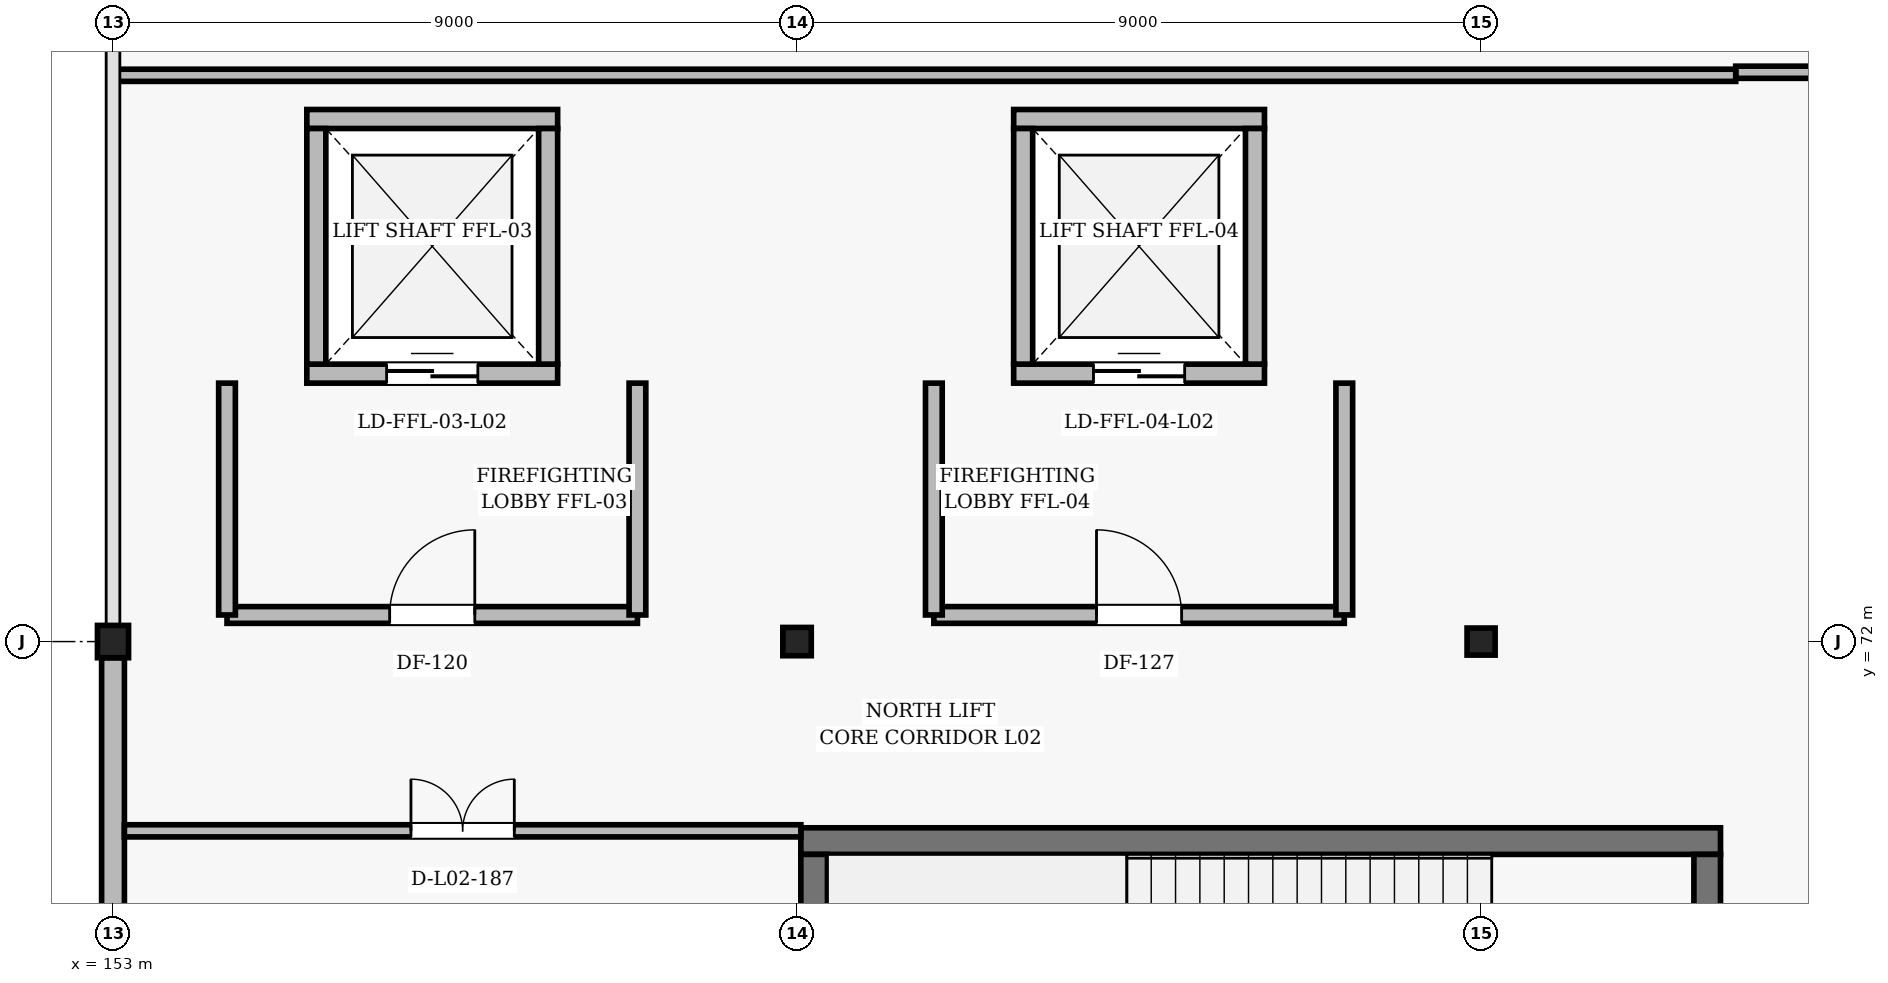
"""IFC4 building model, lengths in metres.
Left out: names, types, materials, properties, quantities, classifications, styles, units other than length and angle.
Written with IfcOpenShell. Run it as: python <this file> out.ifc"""

import sys

from ifc_helpers import new_model, si_unit, direction, frame, frame_2d, origin, origin_2d, place, context, subcontext, project, spatial, rectangle, i_section, extrude, element, fill, save


model = new_model("IFC4")
c1 = context("Model", 3, precision=1e-05, world=origin(), true_north=direction((0.0, 1.0)))
c2 = subcontext(c1, "Body", "Model", "MODEL_VIEW")
j1 = project(units=[si_unit("LENGTHUNIT", "METRE"), si_unit("PLANEANGLEUNIT", "RADIAN")], contexts=[c1])
p1 = place(None, origin())
s1 = spatial("IfcSite", under=j1, at=p1, CompositionType="ELEMENT")
p2 = place(p1, origin())
s2 = spatial("IfcBuilding", under=s1, at=p2, CompositionType="ELEMENT")
p3 = place(p2, frame((0.0, 0.0, 10.8)))
s3 = spatial("IfcBuildingStorey", under=s2, at=p3, CompositionType="ELEMENT", Elevation=10.8)
p4 = place(p3, frame((153.0, 72.0, 0.0), z_axis=(0.0, 0.0, 1.0), x_axis=(1.0, 0.0, 0.0)))
e1 = element("IfcColumn", 1, at=p4, inside=s3, PredefinedType="COLUMN", context=c2, shape_type="SweptSolid", body=[
    extrude(i_section(OverallWidth=0.409, OverallDepth=0.425, WebThickness=0.031, FlangeThickness=0.049, FilletRadius=0.02, at=origin_2d()), origin(), (0.0, 0.0, 1.0), 4.8),
])
p5 = place(p3, frame((162.0, 72.0, 0.0), z_axis=(0.0, 0.0, 1.0), x_axis=(1.0, 0.0, 0.0)))
e2 = element("IfcColumn", 2, at=p5, inside=s3, PredefinedType="COLUMN", context=c2, shape_type="SweptSolid", body=[
    extrude(i_section(OverallWidth=0.374, OverallDepth=0.372, WebThickness=0.016, FlangeThickness=0.026, FilletRadius=0.016, at=origin_2d()), origin(), (0.0, 0.0, 1.0), 4.8),
])
p6 = place(p3, frame((171.0, 72.0, 0.0), z_axis=(0.0, 0.0, 1.0), x_axis=(1.0, 0.0, 0.0)))
e3 = element("IfcColumn", 3, at=p6, inside=s3, PredefinedType="COLUMN", context=c2, shape_type="SweptSolid", body=[
    extrude(i_section(OverallWidth=0.369, OverallDepth=0.356, WebThickness=0.011, FlangeThickness=0.018, FilletRadius=0.015, at=origin_2d()), origin(), (0.0, 0.0, 1.0), 4.8),
])
p7 = place(p3, frame((153.0, 63.347, 0.0), z_axis=(0.0, 0.0, 1.0), x_axis=(0.0, 1.0, 0.0)))
e4 = element("IfcWall", 4, at=p7, inside=s3, PredefinedType="SOLIDWALL", context=c2, shape_type="SweptSolid", body=[
    extrude(rectangle(XDim=8.44, YDim=0.3, at=frame_2d((4.22, 0.0))), origin(), (0.0, 0.0, 1.0), 3.89),
])
p8 = place(p3, frame((174.15, 69.375, 0.0), z_axis=(0.0, 0.0, 1.0), x_axis=(-1.0, 0.0, 0.0)))
e5 = element("IfcWall", 5, at=p8, inside=s3, PredefinedType="SHEAR", context=c2, shape_type="SweptSolid", body=[
    extrude(rectangle(XDim=12.1, YDim=0.35, at=frame_2d((6.05, 0.0))), origin(), (0.0, 0.0, 1.0), 4.6),
])
p9 = place(p3, frame((162.225, 69.2, 0.0), z_axis=(0.0, 0.0, 1.0), x_axis=(0.0, -1.0, 0.0)))
e6 = element("IfcWall", 6, at=p9, inside=s3, PredefinedType="SHEAR", context=c2, shape_type="SweptSolid", body=[
    extrude(rectangle(XDim=5.5, YDim=0.35, at=frame_2d((2.75, 0.0))), origin(), (0.0, 0.0, 1.0), 4.6),
])
p10 = place(p3, frame((173.975, 63.7, 0.0), z_axis=(0.0, 0.0, 1.0), x_axis=(0.0, 1.0, 0.0)))
e7 = element("IfcWall", 7, at=p10, inside=s3, PredefinedType="SHEAR", context=c2, shape_type="SweptSolid", body=[
    extrude(rectangle(XDim=5.5, YDim=0.35, at=frame_2d((2.75, 0.0))), origin(), (0.0, 0.0, 1.0), 4.6),
])
p11 = place(p10, frame((1.85, 0.0, 0.0)))
e8 = element("IfcOpeningElement", 8, at=p11, cuts=e7, PredefinedType="OPENING", context=c2, shape_type="SweptSolid", body=[
    extrude(rectangle(XDim=1.8, YDim=2.2, at=frame_2d((0.9, 1.1))), frame((0.0, 0.185, 0.0), z_axis=(0.0, -1.0, 0.0), x_axis=(1.0, 0.0, 0.0)), (0.0, 0.0, 1.0), 0.37),
])
p12 = place(p3, frame((155.55, 75.525, 0.0), z_axis=(0.0, 0.0, 1.0), x_axis=(1.0, 0.0, 0.0)))
e9 = element("IfcWall", 9, at=p12, inside=s3, PredefinedType="SOLIDWALL", context=c2, shape_type="SweptSolid", body=[
    extrude(rectangle(XDim=3.3, YDim=0.25, at=frame_2d((1.65, 0.0))), origin(), (0.0, 0.0, 1.0), 4.6),
])
p13 = place(p12, frame((1.05, 0.0, 0.0)))
e10 = element("IfcOpeningElement", 10, at=p13, cuts=e9, PredefinedType="OPENING", context=c2, shape_type="SweptSolid", body=[
    extrude(rectangle(XDim=1.2, YDim=2.25, at=frame_2d((0.6, 1.125))), frame((0.0, 0.135, 0.0), z_axis=(0.0, -1.0, 0.0), x_axis=(1.0, 0.0, 0.0)), (0.0, 0.0, 1.0), 0.27),
])
p14 = place(p3, frame((158.85, 78.875, 0.0), z_axis=(0.0, 0.0, 1.0), x_axis=(-1.0, 0.0, 0.0)))
e11 = element("IfcWall", 11, at=p14, inside=s3, PredefinedType="SOLIDWALL", context=c2, shape_type="SweptSolid", body=[
    extrude(rectangle(XDim=3.3, YDim=0.25, at=frame_2d((1.65, 0.0))), origin(), (0.0, 0.0, 1.0), 4.6),
])
for number, where, z_axis, x_axis in (
    (12, (155.675, 78.75, 0.0), (0.0, 0.0, 1.0), (0.0, -1.0, 0.0)),
    (13, (158.725, 75.65, 0.0), (0.0, 0.0, 1.0), (0.0, 1.0, 0.0)),
):
    element("IfcWall", number, at=place(p3, frame(where, z_axis=z_axis, x_axis=x_axis)), inside=s3, PredefinedType="SOLIDWALL", context=c2, shape_type="SweptSolid", body=[
        extrude(rectangle(XDim=3.1, YDim=0.25, at=frame_2d((1.55, 0.0))), origin(), (0.0, 0.0, 1.0), 4.6),
    ])
p15 = place(p3, frame((154.5, 72.35, 0.0), z_axis=(0.0, 0.0, 1.0), x_axis=(1.0, 0.0, 0.0)))
e14 = element("IfcWall", 14, at=p15, inside=s3, PredefinedType="SOLIDWALL", context=c2, shape_type="SweptSolid", body=[
    extrude(rectangle(XDim=5.4, YDim=0.22, at=frame_2d((2.7, 0.0))), origin(), (0.0, 0.0, 1.0), 3.974),
])
p16 = place(p15, frame((2.14, 0.0, 0.0)))
e15 = element("IfcOpeningElement", 15, at=p16, cuts=e14, PredefinedType="OPENING", context=c2, shape_type="SweptSolid", body=[
    extrude(rectangle(XDim=1.12, YDim=2.2, at=frame_2d((0.56, 1.1))), frame((0.0, 0.12, 0.0), z_axis=(0.0, -1.0, 0.0), x_axis=(1.0, 0.0, 0.0)), (0.0, 0.0, 1.0), 0.24),
])
for number, where, z_axis, x_axis in (
    (16, (154.5, 72.35, 0.0), (0.0, 0.0, 1.0), (0.0, 1.0, 0.0)),
    (17, (159.9, 72.35, 0.0), (0.0, 0.0, 1.0), (0.0, 1.0, 0.0)),
):
    element("IfcWall", number, at=place(p3, frame(where, z_axis=z_axis, x_axis=x_axis)), inside=s3, PredefinedType="SOLIDWALL", context=c2, shape_type="SweptSolid", body=[
        extrude(rectangle(XDim=3.05, YDim=0.22, at=frame_2d((1.525, 0.0))), origin(), (0.0, 0.0, 1.0), 3.974),
    ])
p17 = place(p3, frame((164.85, 75.525, 0.0), z_axis=(0.0, 0.0, 1.0), x_axis=(1.0, 0.0, 0.0)))
e18 = element("IfcWall", 18, at=p17, inside=s3, PredefinedType="SOLIDWALL", context=c2, shape_type="SweptSolid", body=[
    extrude(rectangle(XDim=3.3, YDim=0.25, at=frame_2d((1.65, 0.0))), origin(), (0.0, 0.0, 1.0), 4.6),
])
p18 = place(p17, frame((1.05, 0.0, 0.0)))
e19 = element("IfcOpeningElement", 19, at=p18, cuts=e18, PredefinedType="OPENING", context=c2, shape_type="SweptSolid", body=[
    extrude(rectangle(XDim=1.2, YDim=2.25, at=frame_2d((0.6, 1.125))), frame((0.0, 0.135, 0.0), z_axis=(0.0, -1.0, 0.0), x_axis=(1.0, 0.0, 0.0)), (0.0, 0.0, 1.0), 0.27),
])
p19 = place(p3, frame((168.15, 78.875, 0.0), z_axis=(0.0, 0.0, 1.0), x_axis=(-1.0, 0.0, 0.0)))
e20 = element("IfcWall", 20, at=p19, inside=s3, PredefinedType="SOLIDWALL", context=c2, shape_type="SweptSolid", body=[
    extrude(rectangle(XDim=3.3, YDim=0.25, at=frame_2d((1.65, 0.0))), origin(), (0.0, 0.0, 1.0), 4.6),
])
for number, where, z_axis, x_axis in (
    (21, (164.975, 78.75, 0.0), (0.0, 0.0, 1.0), (0.0, -1.0, 0.0)),
    (22, (168.025, 75.65, 0.0), (0.0, 0.0, 1.0), (0.0, 1.0, 0.0)),
):
    element("IfcWall", number, at=place(p3, frame(where, z_axis=z_axis, x_axis=x_axis)), inside=s3, PredefinedType="SOLIDWALL", context=c2, shape_type="SweptSolid", body=[
        extrude(rectangle(XDim=3.1, YDim=0.25, at=frame_2d((1.55, 0.0))), origin(), (0.0, 0.0, 1.0), 4.6),
    ])
p20 = place(p3, frame((163.8, 72.35, 0.0), z_axis=(0.0, 0.0, 1.0), x_axis=(1.0, 0.0, 0.0)))
e23 = element("IfcWall", 23, at=p20, inside=s3, PredefinedType="SOLIDWALL", context=c2, shape_type="SweptSolid", body=[
    extrude(rectangle(XDim=5.4, YDim=0.22, at=frame_2d((2.7, 0.0))), origin(), (0.0, 0.0, 1.0), 3.812),
])
p21 = place(p20, frame((2.14, 0.0, 0.0)))
e24 = element("IfcOpeningElement", 24, at=p21, cuts=e23, PredefinedType="OPENING", context=c2, shape_type="SweptSolid", body=[
    extrude(rectangle(XDim=1.12, YDim=2.2, at=frame_2d((0.56, 1.1))), frame((0.0, 0.12, 0.0), z_axis=(0.0, -1.0, 0.0), x_axis=(1.0, 0.0, 0.0)), (0.0, 0.0, 1.0), 0.24),
])
for number, where, z_axis, x_axis in (
    (25, (163.8, 72.35, 0.0), (0.0, 0.0, 1.0), (0.0, 1.0, 0.0)),
    (26, (169.2, 72.35, 0.0), (0.0, 0.0, 1.0), (0.0, 1.0, 0.0)),
):
    element("IfcWall", number, at=place(p3, frame(where, z_axis=z_axis, x_axis=x_axis)), inside=s3, PredefinedType="SOLIDWALL", context=c2, shape_type="SweptSolid", body=[
        extrude(rectangle(XDim=3.05, YDim=0.22, at=frame_2d((1.525, 0.0))), origin(), (0.0, 0.0, 1.0), 3.812),
    ])
p22 = place(p3, frame((153.15, 69.51, 0.0), z_axis=(0.0, 0.0, 1.0), x_axis=(1.0, 0.0, 0.0)))
e27 = element("IfcWall", 27, at=p22, inside=s3, PredefinedType="PARTITIONING", context=c2, shape_type="SweptSolid", body=[
    extrude(rectangle(XDim=8.9, YDim=0.16, at=frame_2d((4.45, 0.0))), origin(), (0.0, 0.0, 1.0), 3.812),
])
p23 = place(p22, frame((3.77, 0.0, 0.0)))
e28 = element("IfcOpeningElement", 28, at=p23, cuts=e27, PredefinedType="OPENING", context=c2, shape_type="SweptSolid", body=[
    extrude(rectangle(XDim=1.36, YDim=2.28, at=frame_2d((0.68, 1.14))), frame((0.0, 0.09, 0.0), z_axis=(0.0, -1.0, 0.0), x_axis=(1.0, 0.0, 0.0)), (0.0, 0.0, 1.0), 0.18),
])
p24 = place(p3, frame((179.45, 79.49, 0.0), z_axis=(0.0, 0.0, 1.0), x_axis=(-1.0, 0.0, 0.0)))
e29 = element("IfcWall", 29, at=p24, inside=s3, PredefinedType="PARTITIONING", context=c2, shape_type="SweptSolid", body=[
    extrude(rectangle(XDim=5.1, YDim=0.16, at=frame_2d((2.55, 0.0))), origin(), (0.0, 0.0, 1.0), 4.6),
])
p25 = place(p24, frame((1.425, 0.0, 0.0)))
e30 = element("IfcOpeningElement", 30, at=p25, cuts=e29, PredefinedType="OPENING", context=c2, shape_type="SweptSolid", body=[
    extrude(rectangle(XDim=2.25, YDim=2.4, at=frame_2d((1.125, 1.2))), frame((0.0, 0.09, 0.0), z_axis=(0.0, -1.0, 0.0), x_axis=(1.0, 0.0, 0.0)), (0.0, 0.0, 1.0), 0.18),
])
p26 = place(p3, frame((174.35, 79.45, 0.0), z_axis=(0.0, 0.0, 1.0), x_axis=(-1.0, 0.0, 0.0)))
e31 = element("IfcWall", 31, at=p26, inside=s3, PredefinedType="PARTITIONING", context=c2, shape_type="SweptSolid", body=[
    extrude(rectangle(XDim=21.338, YDim=0.16, at=frame_2d((10.669, 0.0))), origin(), (0.0, 0.0, 1.0), 3.89),
])
p27 = place(p13, origin())
e32 = element("IfcDoor", 32, at=p27, inside=s3, OperationType="DOUBLE_DOOR_SLIDING", PredefinedType="DOOR", context=c2, shape_type="SweptSolid", body=[
    extrude(rectangle(XDim=1.2, YDim=2.25, at=frame_2d((0.6, 1.125))), frame((0.0, 0.025, 0.0), z_axis=(0.0, -1.0, 0.0), x_axis=(1.0, 0.0, 0.0)), (0.0, 0.0, 1.0), 0.05),
])
fill(e10, e32)
p28 = place(p16, origin())
e33 = element("IfcDoor", 33, at=p28, inside=s3, OperationType="SINGLE_SWING_RIGHT", PredefinedType="DOOR", context=c2, shape_type="SweptSolid", body=[
    extrude(rectangle(XDim=1.12, YDim=2.2, at=frame_2d((0.56, 1.1))), frame((0.0, 0.025, 0.0), z_axis=(0.0, -1.0, 0.0), x_axis=(1.0, 0.0, 0.0)), (0.0, 0.0, 1.0), 0.05),
])
fill(e15, e33)
p29 = place(p18, origin())
e34 = element("IfcDoor", 34, at=p29, inside=s3, OperationType="DOUBLE_DOOR_SLIDING", PredefinedType="DOOR", context=c2, shape_type="SweptSolid", body=[
    extrude(rectangle(XDim=1.2, YDim=2.25, at=frame_2d((0.6, 1.125))), frame((0.0, 0.025, 0.0), z_axis=(0.0, -1.0, 0.0), x_axis=(1.0, 0.0, 0.0)), (0.0, 0.0, 1.0), 0.05),
])
fill(e19, e34)
p30 = place(p21, origin())
e35 = element("IfcDoor", 35, at=p30, inside=s3, OperationType="SINGLE_SWING_LEFT", PredefinedType="DOOR", context=c2, shape_type="SweptSolid", body=[
    extrude(rectangle(XDim=1.12, YDim=2.2, at=frame_2d((0.56, 1.1))), frame((0.0, 0.025, 0.0), z_axis=(0.0, -1.0, 0.0), x_axis=(1.0, 0.0, 0.0)), (0.0, 0.0, 1.0), 0.05),
])
fill(e24, e35)
p31 = place(p23, origin())
e36 = element("IfcDoor", 36, at=p31, inside=s3, OperationType="DOUBLE_DOOR_SINGLE_SWING", PredefinedType="DOOR", context=c2, shape_type="SweptSolid", body=[
    extrude(rectangle(XDim=1.36, YDim=2.28, at=frame_2d((0.68, 1.14))), frame((0.0, 0.025, 0.0), z_axis=(0.0, -1.0, 0.0), x_axis=(1.0, 0.0, 0.0)), (0.0, 0.0, 1.0), 0.05),
])
fill(e28, e36)
save(model, sys.argv[1])
